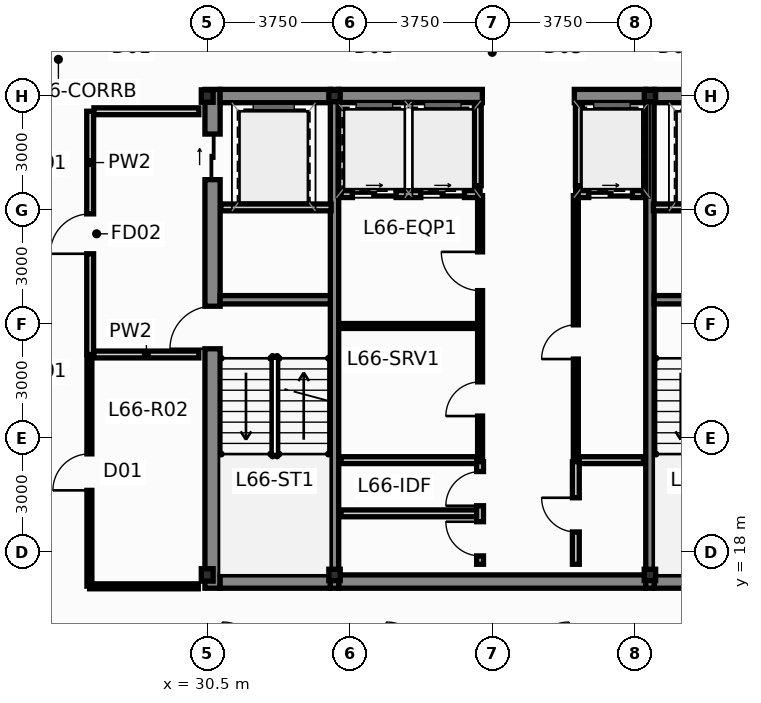
"""IFC4 building model, lengths in metres.
Left out: names, types, materials, properties, quantities, classifications, styles, units other than length and angle.
Written with IfcOpenShell. Run it as: python <this file> out.ifc"""

import sys

from ifc_helpers import new_model, si_unit, direction, frame, frame_2d, origin, origin_2d, place, context, subcontext, project, spatial, rectangle, hollow_rectangle, i_section, extrude, source, transform, mapped, element, fill, save


model = new_model("IFC4")
c1 = context("Model", 3, precision=1e-05, world=origin(), true_north=direction((0.0, 1.0)))
c2 = subcontext(c1, "Body", "Model", "MODEL_VIEW")
j1 = project(units=[si_unit("LENGTHUNIT", "METRE"), si_unit("PLANEANGLEUNIT", "RADIAN")], contexts=[c1])
p1 = place(None, origin())
s1 = spatial("IfcSite", under=j1, at=p1, CompositionType="ELEMENT")
p2 = place(p1, origin())
s2 = spatial("IfcBuilding", under=s1, at=p2, CompositionType="ELEMENT")
p3 = place(p2, frame((0.0, 0.0, 251.75)))
s3 = spatial("IfcBuildingStorey", under=s2, at=p3, CompositionType="ELEMENT", Elevation=251.75)
m1 = source(origin(), c2, "Body", "SweptSolid", [
    extrude(i_section(OverallWidth=0.311, OverallDepth=0.327, WebThickness=0.016, FlangeThickness=0.025, at=origin_2d()), origin(), (0.0, 0.0, 1.0), 3.65),
])
for number, where, z_axis, x_axis in (
    (1, (30.5, 17.4, 0.0), (0.0, 0.0, 1.0), (1.0, 0.0, 0.0)),
    (2, (30.5, 30.0, 0.0), (0.0, 0.0, 1.0), (1.0, 0.0, 0.0)),
):
    element("IfcColumn", number, at=place(p3, frame(where, z_axis=z_axis, x_axis=x_axis)), inside=s3, PredefinedType="COLUMN", context=c2, shape_type="MappedRepresentation", body=[
        mapped(m1, transform((0.0, 0.0, 0.0), scale=1.0)),
    ])
m2 = source(origin(), c2, "Body", "SweptSolid", [
    extrude(hollow_rectangle(XDim=0.3, YDim=0.3, WallThickness=0.012, at=origin_2d()), origin(), (0.0, 0.0, 1.0), 3.65),
])
for number, where, z_axis, x_axis in (
    (3, (33.85, 17.4, 0.0), (0.0, 0.0, 1.0), (1.0, 0.0, 0.0)),
    (4, (42.15, 17.4, 0.0), (0.0, 0.0, 1.0), (1.0, 0.0, 0.0)),
    (5, (33.85, 30.0, 0.0), (0.0, 0.0, 1.0), (1.0, 0.0, 0.0)),
    (6, (42.15, 30.0, 0.0), (0.0, 0.0, 1.0), (1.0, 0.0, 0.0)),
):
    element("IfcColumn", number, at=place(p3, frame(where, z_axis=z_axis, x_axis=x_axis)), inside=s3, PredefinedType="COLUMN", context=c2, shape_type="MappedRepresentation", body=[
        mapped(m2, transform((0.0, 0.0, 0.0), scale=1.0)),
    ])
p4 = place(p3, frame((30.64, 17.05, 0.0), z_axis=(0.0, 0.0, 1.0), x_axis=(0.0, 1.0, 0.0)))
e7 = element("IfcWall", 7, at=p4, inside=s3, PredefinedType="SHEAR", context=c2, shape_type="SweptSolid", body=[
    extrude(rectangle(XDim=13.125, YDim=0.4, at=frame_2d((6.562, 0.0))), origin(), (0.0, 0.0, 1.0), 3.65),
])
p5 = place(p4, frame((6.3, 0.0, 0.0)))
e8 = element("IfcOpeningElement", 8, at=p5, cuts=e7, PredefinedType="OPENING", context=c2, shape_type="SweptSolid", body=[
    extrude(rectangle(XDim=1.12, YDim=2.15, at=frame_2d((0.56, 1.075))), frame((0.0, 0.212, 0.0), z_axis=(0.0, -1.0, 0.0), x_axis=(1.0, 0.0, 0.0)), (0.0, 0.0, 1.0), 0.424),
])
p6 = place(p4, frame((10.75, 0.0, 0.0)))
e9 = element("IfcOpeningElement", 9, at=p6, cuts=e7, PredefinedType="OPENING", context=c2, shape_type="SweptSolid", body=[
    extrude(rectangle(XDim=1.2, YDim=2.2, at=frame_2d((0.6, 1.1))), frame((0.0, 0.212, 0.0), z_axis=(0.0, -1.0, 0.0), x_axis=(1.0, 0.0, 0.0)), (0.0, 0.0, 1.0), 0.424),
])
p7 = place(p3, frame((30.84, 17.225, 0.0), z_axis=(0.0, 0.0, 1.0), x_axis=(1.0, 0.0, 0.0)))
e10 = element("IfcWall", 10, at=p7, inside=s3, PredefinedType="SHEAR", context=c2, shape_type="SweptSolid", body=[
    extrude(rectangle(XDim=2.9, YDim=0.35, at=frame_2d((1.45, 0.0))), origin(), (0.0, 0.0, 1.0), 3.65),
])
p8 = place(p3, frame((33.96, 17.225, 0.0), z_axis=(0.0, 0.0, 1.0), x_axis=(1.0, 0.0, 0.0)))
e11 = element("IfcWall", 11, at=p8, inside=s3, PredefinedType="SHEAR", context=c2, shape_type="SweptSolid", body=[
    extrude(rectangle(XDim=8.08, YDim=0.35, at=frame_2d((4.04, 0.0))), origin(), (0.0, 0.0, 1.0), 3.65),
])
for number, where, z_axis, x_axis in (
    (12, (42.26, 17.225, 0.0), (0.0, 0.0, 1.0), (1.0, 0.0, 0.0)),
    (13, (30.84, 30.0, 0.0), (0.0, 0.0, 1.0), (1.0, 0.0, 0.0)),
):
    element("IfcWall", number, at=place(p3, frame(where, z_axis=z_axis, x_axis=x_axis)), inside=s3, PredefinedType="SHEAR", context=c2, shape_type="SweptSolid", body=[
        extrude(rectangle(XDim=2.9, YDim=0.35, at=frame_2d((1.45, 0.0))), origin(), (0.0, 0.0, 1.0), 3.65),
    ])
p9 = place(p3, frame((33.96, 30.0, 0.0), z_axis=(0.0, 0.0, 1.0), x_axis=(1.0, 0.0, 0.0)))
e14 = element("IfcWall", 14, at=p9, inside=s3, PredefinedType="SHEAR", context=c2, shape_type="SweptSolid", body=[
    extrude(rectangle(XDim=3.78, YDim=0.35, at=frame_2d((1.89, 0.0))), origin(), (0.0, 0.0, 1.0), 3.65),
])
p10 = place(p3, frame((40.16, 30.0, 0.0), z_axis=(0.0, 0.0, 1.0), x_axis=(1.0, 0.0, 0.0)))
e15 = element("IfcWall", 15, at=p10, inside=s3, PredefinedType="SHEAR", context=c2, shape_type="SweptSolid", body=[
    extrude(rectangle(XDim=1.88, YDim=0.35, at=frame_2d((0.94, 0.0))), origin(), (0.0, 0.0, 1.0), 3.65),
])
p11 = place(p3, frame((42.26, 30.0, 0.0), z_axis=(0.0, 0.0, 1.0), x_axis=(1.0, 0.0, 0.0)))
e16 = element("IfcWall", 16, at=p11, inside=s3, PredefinedType="SHEAR", context=c2, shape_type="SweptSolid", body=[
    extrude(rectangle(XDim=2.9, YDim=0.35, at=frame_2d((1.45, 0.0))), origin(), (0.0, 0.0, 1.0), 3.65),
])
for number, where, z_axis, x_axis in (
    (17, (33.85, 17.05, 0.0), (0.0, 0.0, 1.0), (0.0, 1.0, 0.0)),
    (18, (42.15, 17.05, 0.0), (0.0, 0.0, 1.0), (0.0, 1.0, 0.0)),
):
    element("IfcWall", number, at=place(p3, frame(where, z_axis=z_axis, x_axis=x_axis)), inside=s3, PredefinedType="SHEAR", context=c2, shape_type="SweptSolid", body=[
        extrude(rectangle(XDim=13.125, YDim=0.22, at=frame_2d((6.562, 0.0))), origin(), (0.0, 0.0, 1.0), 3.65),
    ])
for number, where, z_axis, x_axis in (
    (19, (30.84, 24.64, 0.0), (0.0, 0.0, 1.0), (1.0, 0.0, 0.0)),
    (20, (42.26, 24.64, 0.0), (0.0, 0.0, 1.0), (1.0, 0.0, 0.0)),
):
    element("IfcWall", number, at=place(p3, frame(where, z_axis=z_axis, x_axis=x_axis)), inside=s3, PredefinedType="SHEAR", context=c2, shape_type="SweptSolid", body=[
        extrude(rectangle(XDim=2.9, YDim=0.22, at=frame_2d((1.45, 0.0))), origin(), (0.0, 0.0, 1.0), 3.65),
    ])
p12 = place(p3, frame((34.02, 27.42, 0.0), z_axis=(0.0, 0.0, 1.0), x_axis=(1.0, 0.0, 0.0)))
e21 = element("IfcWall", 21, at=p12, inside=s3, PredefinedType="PARTITIONING", context=c2, shape_type="SweptSolid", body=[
    extrude(rectangle(XDim=3.66, YDim=0.18, at=frame_2d((1.83, 0.0))), origin(), (0.0, 0.0, 1.0), 3.4),
])
p13 = place(p12, frame((0.3, 0.0, 0.0)))
e22 = element("IfcOpeningElement", 22, at=p13, cuts=e21, PredefinedType="OPENING", context=c2, shape_type="SweptSolid", body=[
    extrude(rectangle(XDim=1.15, YDim=2.2, at=frame_2d((0.575, 1.1))), frame((0.0, 0.102, 0.0), z_axis=(0.0, -1.0, 0.0), x_axis=(1.0, 0.0, 0.0)), (0.0, 0.0, 1.0), 0.204),
])
p14 = place(p12, frame((2.1, 0.0, 0.0)))
e23 = element("IfcOpeningElement", 23, at=p14, cuts=e21, PredefinedType="OPENING", context=c2, shape_type="SweptSolid", body=[
    extrude(rectangle(XDim=1.15, YDim=2.2, at=frame_2d((0.575, 1.1))), frame((0.0, 0.102, 0.0), z_axis=(0.0, -1.0, 0.0), x_axis=(1.0, 0.0, 0.0)), (0.0, 0.0, 1.0), 0.204),
])
p15 = place(p3, frame((40.22, 27.42, 0.0), z_axis=(0.0, 0.0, 1.0), x_axis=(1.0, 0.0, 0.0)))
e24 = element("IfcWall", 24, at=p15, inside=s3, PredefinedType="PARTITIONING", context=c2, shape_type="SweptSolid", body=[
    extrude(rectangle(XDim=1.76, YDim=0.18, at=frame_2d((0.88, 0.0))), origin(), (0.0, 0.0, 1.0), 3.4),
])
p16 = place(p15, frame((0.32, 0.0, 0.0)))
e25 = element("IfcOpeningElement", 25, at=p16, cuts=e24, PredefinedType="OPENING", context=c2, shape_type="SweptSolid", body=[
    extrude(rectangle(XDim=1.15, YDim=2.2, at=frame_2d((0.575, 1.1))), frame((0.0, 0.102, 0.0), z_axis=(0.0, -1.0, 0.0), x_axis=(1.0, 0.0, 0.0)), (0.0, 0.0, 1.0), 0.204),
])
for number, where, z_axis, x_axis in (
    (26, (37.62, 27.64, 0.0), (0.0, 0.0, 1.0), (0.0, 1.0, 0.0)),
    (27, (40.28, 27.64, 0.0), (0.0, 0.0, 1.0), (0.0, 1.0, 0.0)),
):
    element("IfcWall", number, at=place(p3, frame(where, z_axis=z_axis, x_axis=x_axis)), inside=s3, PredefinedType="PARTITIONING", context=c2, shape_type="SweptSolid", body=[
        extrude(rectangle(XDim=2.11, YDim=0.18, at=frame_2d((1.055, 0.0))), origin(), (0.0, 0.0, 1.0), 3.4),
    ])
p17 = place(p3, frame((27.42, 23.2, 0.0), z_axis=(0.0, 0.0, 1.0), x_axis=(0.0, 1.0, 0.0)))
e28 = element("IfcWall", 28, at=p17, inside=s3, PredefinedType="PARTITIONING", context=c2, shape_type="SweptSolid", body=[
    extrude(rectangle(XDim=6.4, YDim=0.18, at=frame_2d((3.2, 0.0))), origin(), (0.0, 0.0, 1.0), 3.129),
])
p18 = place(p17, frame((2.65, 0.0, 0.0)))
e29 = element("IfcOpeningElement", 29, at=p18, cuts=e28, PredefinedType="OPENING", context=c2, shape_type="SweptSolid", body=[
    extrude(rectangle(XDim=1.05, YDim=2.15, at=frame_2d((0.525, 1.075))), frame((0.0, 0.102, 0.0), z_axis=(0.0, -1.0, 0.0), x_axis=(1.0, 0.0, 0.0)), (0.0, 0.0, 1.0), 0.204),
])
for number, where, z_axis, x_axis in (
    (30, (27.52, 23.2, 0.0), (0.0, 0.0, 1.0), (1.0, 0.0, 0.0)),
    (31, (27.52, 29.6, 0.0), (0.0, 0.0, 1.0), (1.0, 0.0, 0.0)),
):
    element("IfcWall", number, at=place(p3, frame(where, z_axis=z_axis, x_axis=x_axis)), inside=s3, PredefinedType="PARTITIONING", context=c2, shape_type="SweptSolid", body=[
        extrude(rectangle(XDim=2.76, YDim=0.18, at=frame_2d((1.38, 0.0))), origin(), (0.0, 0.0, 1.0), 3.4),
    ])
for number, where, z_axis, x_axis in (
    (32, (30.86, 27.07, 0.0), (0.0, 0.0, 1.0), (1.0, 0.0, 0.0)),
    (33, (42.24, 27.07, 0.0), (0.0, 0.0, 1.0), (1.0, 0.0, 0.0)),
):
    element("IfcWall", number, at=place(p3, frame(where, z_axis=z_axis, x_axis=x_axis)), inside=s3, PredefinedType="PARTITIONING", context=c2, shape_type="SweptSolid", body=[
        extrude(rectangle(XDim=2.9, YDim=0.18, at=frame_2d((1.45, 0.0))), origin(), (0.0, 0.0, 1.0), 3.4),
    ])
p19 = place(p3, frame((34.02, 20.42, 0.0), z_axis=(0.0, 0.0, 1.0), x_axis=(1.0, 0.0, 0.0)))
e34 = element("IfcWall", 34, at=p19, inside=s3, PredefinedType="PARTITIONING", context=c2, shape_type="SweptSolid", body=[
    extrude(rectangle(XDim=3.64, YDim=0.18, at=frame_2d((1.82, 0.0))), origin(), (0.0, 0.0, 1.0), 3.4),
])
p20 = place(p3, frame((40.22, 20.42, 0.0), z_axis=(0.0, 0.0, 1.0), x_axis=(1.0, 0.0, 0.0)))
e35 = element("IfcWall", 35, at=p20, inside=s3, PredefinedType="PARTITIONING", context=c2, shape_type="SweptSolid", body=[
    extrude(rectangle(XDim=1.76, YDim=0.18, at=frame_2d((0.88, 0.0))), origin(), (0.0, 0.0, 1.0), 3.4),
])
p21 = place(p3, frame((34.02, 23.95, 0.0), z_axis=(0.0, 0.0, 1.0), x_axis=(1.0, 0.0, 0.0)))
e36 = element("IfcWall", 36, at=p21, inside=s3, PredefinedType="PARTITIONING", context=c2, shape_type="SweptSolid", body=[
    extrude(rectangle(XDim=3.58, YDim=0.13, at=frame_2d((1.79, 0.0))), origin(), (0.0, 0.0, 1.0), 3.4),
])
p22 = place(p3, frame((37.68, 20.48, 0.0), z_axis=(0.0, 0.0, 1.0), x_axis=(0.0, 1.0, 0.0)))
e37 = element("IfcWall", 37, at=p22, inside=s3, PredefinedType="PARTITIONING", context=c2, shape_type="SweptSolid", body=[
    extrude(rectangle(XDim=6.9, YDim=0.13, at=frame_2d((3.45, 0.0))), origin(), (0.0, 0.0, 1.0), 3.4),
])
p23 = place(p22, frame((1.1, 0.0, 0.0)))
e38 = element("IfcOpeningElement", 38, at=p23, cuts=e37, PredefinedType="OPENING", context=c2, shape_type="SweptSolid", body=[
    extrude(rectangle(XDim=0.9, YDim=2.1, at=frame_2d((0.45, 1.05))), frame((0.0, 0.077, 0.0), z_axis=(0.0, -1.0, 0.0), x_axis=(1.0, 0.0, 0.0)), (0.0, 0.0, 1.0), 0.154),
])
p24 = place(p22, frame((4.4, 0.0, 0.0)))
e39 = element("IfcOpeningElement", 39, at=p24, cuts=e37, PredefinedType="OPENING", context=c2, shape_type="SweptSolid", body=[
    extrude(rectangle(XDim=1.02, YDim=2.15, at=frame_2d((0.51, 1.075))), frame((0.0, 0.077, 0.0), z_axis=(0.0, -1.0, 0.0), x_axis=(1.0, 0.0, 0.0)), (0.0, 0.0, 1.0), 0.154),
])
p25 = place(p3, frame((40.2, 20.48, 0.0), z_axis=(0.0, 0.0, 1.0), x_axis=(0.0, 1.0, 0.0)))
e40 = element("IfcWall", 40, at=p25, inside=s3, PredefinedType="PARTITIONING", context=c2, shape_type="SweptSolid", body=[
    extrude(rectangle(XDim=6.9, YDim=0.13, at=frame_2d((3.45, 0.0))), origin(), (0.0, 0.0, 1.0), 3.4),
])
p26 = place(p25, frame((2.6, 0.0, 0.0)))
e41 = element("IfcOpeningElement", 41, at=p26, cuts=e40, PredefinedType="OPENING", context=c2, shape_type="SweptSolid", body=[
    extrude(rectangle(XDim=0.9, YDim=2.1, at=frame_2d((0.45, 1.05))), frame((0.0, 0.077, 0.0), z_axis=(0.0, -1.0, 0.0), x_axis=(1.0, 0.0, 0.0)), (0.0, 0.0, 1.0), 0.154),
])
p27 = place(p3, frame((34.02, 19.02, 0.0), z_axis=(0.0, 0.0, 1.0), x_axis=(1.0, 0.0, 0.0)))
e42 = element("IfcWall", 42, at=p27, inside=s3, PredefinedType="PARTITIONING", context=c2, shape_type="SweptSolid", body=[
    extrude(rectangle(XDim=3.58, YDim=0.18, at=frame_2d((1.79, 0.0))), origin(), (0.0, 0.0, 1.0), 3.4),
])
p28 = place(p3, frame((37.68, 17.68, 0.0), z_axis=(0.0, 0.0, 1.0), x_axis=(0.0, 1.0, 0.0)))
e43 = element("IfcWall", 43, at=p28, inside=s3, PredefinedType="PARTITIONING", context=c2, shape_type="SweptSolid", body=[
    extrude(rectangle(XDim=2.7, YDim=0.18, at=frame_2d((1.35, 0.0))), origin(), (0.0, 0.0, 1.0), 3.4),
])
p29 = place(p28, frame((0.22, 0.0, 0.0)))
e44 = element("IfcOpeningElement", 44, at=p29, cuts=e43, PredefinedType="OPENING", context=c2, shape_type="SweptSolid", body=[
    extrude(rectangle(XDim=0.9, YDim=2.1, at=frame_2d((0.45, 1.05))), frame((0.0, 0.102, 0.0), z_axis=(0.0, -1.0, 0.0), x_axis=(1.0, 0.0, 0.0)), (0.0, 0.0, 1.0), 0.204),
])
p30 = place(p28, frame((1.54, 0.0, 0.0)))
e45 = element("IfcOpeningElement", 45, at=p30, cuts=e43, PredefinedType="OPENING", context=c2, shape_type="SweptSolid", body=[
    extrude(rectangle(XDim=0.9, YDim=2.1, at=frame_2d((0.45, 1.05))), frame((0.0, 0.102, 0.0), z_axis=(0.0, -1.0, 0.0), x_axis=(1.0, 0.0, 0.0)), (0.0, 0.0, 1.0), 0.204),
])
p31 = place(p3, frame((40.2, 17.68, 0.0), z_axis=(0.0, 0.0, 1.0), x_axis=(0.0, 1.0, 0.0)))
e46 = element("IfcWall", 46, at=p31, inside=s3, PredefinedType="PARTITIONING", context=c2, shape_type="SweptSolid", body=[
    extrude(rectangle(XDim=2.7, YDim=0.18, at=frame_2d((1.35, 0.0))), origin(), (0.0, 0.0, 1.0), 3.4),
])
p32 = place(p31, frame((0.85, 0.0, 0.0)))
e47 = element("IfcOpeningElement", 47, at=p32, cuts=e46, PredefinedType="OPENING", context=c2, shape_type="SweptSolid", body=[
    extrude(rectangle(XDim=0.9, YDim=2.1, at=frame_2d((0.45, 1.05))), frame((0.0, 0.102, 0.0), z_axis=(0.0, -1.0, 0.0), x_axis=(1.0, 0.0, 0.0)), (0.0, 0.0, 1.0), 0.204),
])
p33 = place(p3, frame((27.4, 17.105, 0.0), z_axis=(0.0, 0.0, 1.0), x_axis=(0.0, 1.0, 0.0)))
e48 = element("IfcWall", 48, at=p33, inside=s3, PredefinedType="PARTITIONING", context=c2, shape_type="SweptSolid", body=[
    extrude(rectangle(XDim=6.0, YDim=0.13, at=frame_2d((3.0, 0.0))), origin(), (0.0, 0.0, 1.0), 3.4),
])
p34 = place(p33, frame((2.52, 0.0, 0.0)))
e49 = element("IfcOpeningElement", 49, at=p34, cuts=e48, PredefinedType="OPENING", context=c2, shape_type="SweptSolid", body=[
    extrude(rectangle(XDim=0.96, YDim=2.15, at=frame_2d((0.48, 1.075))), frame((0.0, 0.077, 0.0), z_axis=(0.0, -1.0, 0.0), x_axis=(1.0, 0.0, 0.0)), (0.0, 0.0, 1.0), 0.154),
])
p35 = place(p3, frame((30.265, 17.1, 0.0), z_axis=(0.0, 0.0, 1.0), x_axis=(-1.0, 0.0, 0.0)))
e50 = element("IfcWall", 50, at=p35, inside=s3, PredefinedType="PARTITIONING", context=c2, shape_type="SweptSolid", body=[
    extrude(rectangle(XDim=2.86, YDim=0.13, at=frame_2d((1.43, 0.0))), origin(), (0.0, 0.0, 1.0), 2.985),
])
p36 = place(p5, origin())
e51 = element("IfcDoor", 51, at=p36, inside=s3, OperationType="SINGLE_SWING_LEFT", PredefinedType="DOOR", context=c2, shape_type="SweptSolid", body=[
    extrude(rectangle(XDim=1.12, YDim=2.15, at=frame_2d((0.56, 1.075))), frame((0.0, 0.025, 0.0), z_axis=(0.0, -1.0, 0.0), x_axis=(1.0, 0.0, 0.0)), (0.0, 0.0, 1.0), 0.05),
])
fill(e8, e51)
p37 = place(p6, origin())
e52 = element("IfcDoor", 52, at=p37, inside=s3, OperationType="SLIDING_TO_LEFT", PredefinedType="DOOR", context=c2, shape_type="SweptSolid", body=[
    extrude(rectangle(XDim=1.2, YDim=2.2, at=frame_2d((0.6, 1.1))), frame((0.0, 0.025, 0.0), z_axis=(0.0, -1.0, 0.0), x_axis=(1.0, 0.0, 0.0)), (0.0, 0.0, 1.0), 0.05),
])
fill(e9, e52)
p38 = place(p13, origin())
e53 = element("IfcDoor", 53, at=p38, inside=s3, OperationType="SLIDING_TO_RIGHT", PredefinedType="DOOR", context=c2, shape_type="SweptSolid", body=[
    extrude(rectangle(XDim=1.15, YDim=2.2, at=frame_2d((0.575, 1.1))), frame((0.0, 0.025, 0.0), z_axis=(0.0, -1.0, 0.0), x_axis=(1.0, 0.0, 0.0)), (0.0, 0.0, 1.0), 0.05),
])
fill(e22, e53)
p39 = place(p14, origin())
e54 = element("IfcDoor", 54, at=p39, inside=s3, OperationType="SLIDING_TO_LEFT", PredefinedType="DOOR", context=c2, shape_type="SweptSolid", body=[
    extrude(rectangle(XDim=1.15, YDim=2.2, at=frame_2d((0.575, 1.1))), frame((0.0, 0.025, 0.0), z_axis=(0.0, -1.0, 0.0), x_axis=(1.0, 0.0, 0.0)), (0.0, 0.0, 1.0), 0.05),
])
fill(e23, e54)
p40 = place(p16, origin())
e55 = element("IfcDoor", 55, at=p40, inside=s3, OperationType="SLIDING_TO_RIGHT", PredefinedType="DOOR", context=c2, shape_type="SweptSolid", body=[
    extrude(rectangle(XDim=1.15, YDim=2.2, at=frame_2d((0.575, 1.1))), frame((0.0, 0.025, 0.0), z_axis=(0.0, -1.0, 0.0), x_axis=(1.0, 0.0, 0.0)), (0.0, 0.0, 1.0), 0.05),
])
fill(e25, e55)
p41 = place(p18, origin())
e56 = element("IfcDoor", 56, at=p41, inside=s3, OperationType="SINGLE_SWING_LEFT", PredefinedType="DOOR", context=c2, shape_type="SweptSolid", body=[
    extrude(rectangle(XDim=1.05, YDim=2.15, at=frame_2d((0.525, 1.075))), frame((0.0, 0.025, 0.0), z_axis=(0.0, -1.0, 0.0), x_axis=(1.0, 0.0, 0.0)), (0.0, 0.0, 1.0), 0.05),
])
fill(e29, e56)
p42 = place(p23, origin())
e57 = element("IfcDoor", 57, at=p42, inside=s3, OperationType="SINGLE_SWING_LEFT", PredefinedType="DOOR", context=c2, shape_type="SweptSolid", body=[
    extrude(rectangle(XDim=0.9, YDim=2.1, at=frame_2d((0.45, 1.05))), frame((0.0, 0.025, 0.0), z_axis=(0.0, -1.0, 0.0), x_axis=(1.0, 0.0, 0.0)), (0.0, 0.0, 1.0), 0.05),
])
fill(e38, e57)
p43 = place(p24, origin())
e58 = element("IfcDoor", 58, at=p43, inside=s3, OperationType="SINGLE_SWING_RIGHT", PredefinedType="DOOR", context=c2, shape_type="SweptSolid", body=[
    extrude(rectangle(XDim=1.02, YDim=2.15, at=frame_2d((0.51, 1.075))), frame((0.0, 0.025, 0.0), z_axis=(0.0, -1.0, 0.0), x_axis=(1.0, 0.0, 0.0)), (0.0, 0.0, 1.0), 0.05),
])
fill(e39, e58)
p44 = place(p26, origin())
e59 = element("IfcDoor", 59, at=p44, inside=s3, OperationType="SINGLE_SWING_LEFT", PredefinedType="DOOR", context=c2, shape_type="SweptSolid", body=[
    extrude(rectangle(XDim=0.9, YDim=2.1, at=frame_2d((0.45, 1.05))), frame((0.0, 0.025, 0.0), z_axis=(0.0, -1.0, 0.0), x_axis=(1.0, 0.0, 0.0)), (0.0, 0.0, 1.0), 0.05),
])
fill(e41, e59)
p45 = place(p29, origin())
e60 = element("IfcDoor", 60, at=p45, inside=s3, OperationType="SINGLE_SWING_RIGHT", PredefinedType="DOOR", context=c2, shape_type="SweptSolid", body=[
    extrude(rectangle(XDim=0.9, YDim=2.1, at=frame_2d((0.45, 1.05))), frame((0.0, 0.025, 0.0), z_axis=(0.0, -1.0, 0.0), x_axis=(1.0, 0.0, 0.0)), (0.0, 0.0, 1.0), 0.05),
])
fill(e44, e60)
p46 = place(p30, origin())
e61 = element("IfcDoor", 61, at=p46, inside=s3, OperationType="SINGLE_SWING_LEFT", PredefinedType="DOOR", context=c2, shape_type="SweptSolid", body=[
    extrude(rectangle(XDim=0.9, YDim=2.1, at=frame_2d((0.45, 1.05))), frame((0.0, 0.025, 0.0), z_axis=(0.0, -1.0, 0.0), x_axis=(1.0, 0.0, 0.0)), (0.0, 0.0, 1.0), 0.05),
])
fill(e45, e61)
p47 = place(p32, origin())
e62 = element("IfcDoor", 62, at=p47, inside=s3, OperationType="SINGLE_SWING_RIGHT", PredefinedType="DOOR", context=c2, shape_type="SweptSolid", body=[
    extrude(rectangle(XDim=0.9, YDim=2.1, at=frame_2d((0.45, 1.05))), frame((0.0, 0.025, 0.0), z_axis=(0.0, -1.0, 0.0), x_axis=(1.0, 0.0, 0.0)), (0.0, 0.0, 1.0), 0.05),
])
fill(e47, e62)
p48 = place(p34, origin())
e63 = element("IfcDoor", 63, at=p48, inside=s3, OperationType="SINGLE_SWING_LEFT", PredefinedType="DOOR", context=c2, shape_type="SweptSolid", body=[
    extrude(rectangle(XDim=0.96, YDim=2.15, at=frame_2d((0.48, 1.075))), frame((0.0, 0.025, 0.0), z_axis=(0.0, -1.0, 0.0), x_axis=(1.0, 0.0, 0.0)), (0.0, 0.0, 1.0), 0.05),
])
fill(e49, e63)
save(model, sys.argv[1])
